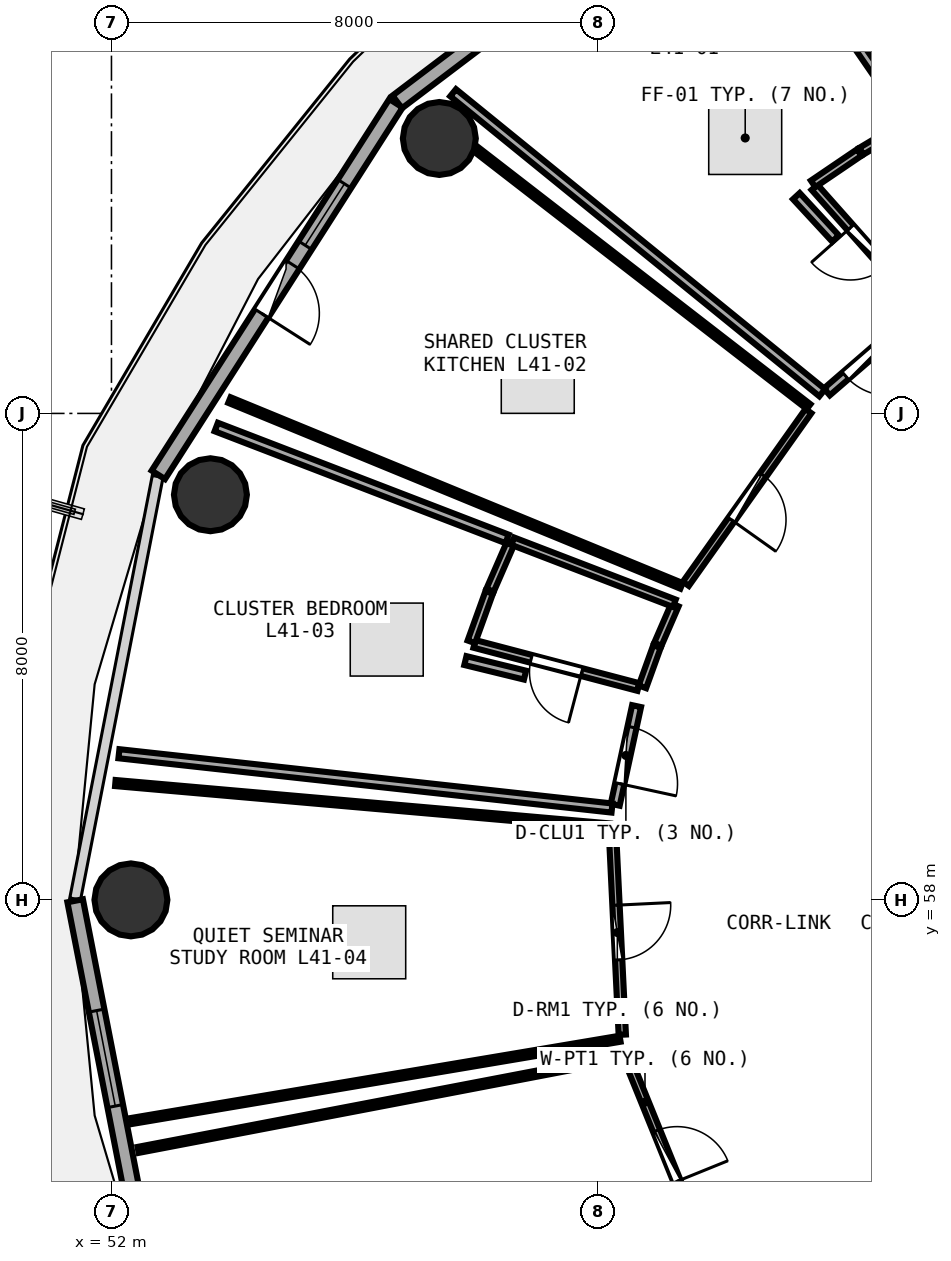
"""IFC4 building model, lengths in metres.
Left out: names, types, materials, properties, quantities, classifications, styles, units other than length and angle.
Written with IfcOpenShell. Run it as: python <this file> out.ifc"""

import sys

from ifc_helpers import new_model, si_unit, direction, frame, frame_2d, origin, origin_2d, place, context, subcontext, project, spatial, rectangle, circle, extrude, element, fill, save


model = new_model("IFC4")
c1 = context("Model", 3, precision=1e-05, world=origin(), true_north=direction((0.0, 1.0)))
c2 = subcontext(c1, "Body", "Model", "MODEL_VIEW")
j1 = project(units=[si_unit("LENGTHUNIT", "METRE"), si_unit("PLANEANGLEUNIT", "RADIAN")], contexts=[c1])
p1 = place(None, origin())
s1 = spatial("IfcSite", under=j1, at=p1, CompositionType="ELEMENT")
p2 = place(p1, origin())
s2 = spatial("IfcBuilding", under=s1, at=p2, CompositionType="ELEMENT")
p3 = place(p2, frame((0.0, 0.0, 161.85)))
s3 = spatial("IfcBuildingStorey", under=s2, at=p3, CompositionType="ELEMENT", Elevation=161.85)
for number, where, z_axis, x_axis in (
    (1, (57.392, 70.521, 0.0), (0.0, 0.0, 1.0), (1.0, 0.0, 0.0)),
    (2, (53.627, 64.663, 0.0), (0.0, 0.0, 1.0), (1.0, 0.0, 0.0)),
    (3, (52.32, 58.0, 0.0), (0.0, 0.0, 1.0), (1.0, 0.0, 0.0)),
):
    element("IfcColumn", number, at=place(p3, frame(where, z_axis=z_axis, x_axis=x_axis)), inside=s3, PredefinedType="COLUMN", context=c2, shape_type="SweptSolid", body=[
        extrude(circle(Radius=0.6, at=origin_2d()), origin(), (0.0, 0.0, 1.0), 3.75),
    ])
p4 = place(p3, frame((62.688, 75.658, 0.0), z_axis=(0.0, 0.0, 1.0), x_axis=(-0.797163719609, -0.603763202042, 0.0)))
e4 = element("IfcWall", 4, at=p4, inside=s3, PredefinedType="SOLIDWALL", context=c2, shape_type="SweptSolid", body=[
    extrude(rectangle(XDim=7.512, YDim=0.26, at=frame_2d((3.756, 0.0))), origin(), (0.0, 0.0, 1.0), 3.475),
])
p5 = place(p4, frame((2.956, 0.0, 0.85)))
e5 = element("IfcOpeningElement", 5, at=p5, cuts=e4, PredefinedType="OPENING", context=c2, shape_type="SweptSolid", body=[
    extrude(rectangle(XDim=1.6, YDim=1.45, at=frame_2d((0.8, 0.725))), frame((0.0, 0.14, 0.0), z_axis=(0.0, -1.0, 0.0), x_axis=(1.0, 0.0, 0.0)), (0.0, 0.0, 1.0), 0.28),
])
p6 = place(p3, frame((56.679, 71.1, 0.0), z_axis=(0.0, 0.0, 1.0), x_axis=(-0.538801521808, -0.842432739213, 0.0)))
e6 = element("IfcWall", 6, at=p6, inside=s3, PredefinedType="SOLIDWALL", context=c2, shape_type="SweptSolid", body=[
    extrude(rectangle(XDim=7.253, YDim=0.26, at=frame_2d((3.627, 0.0))), origin(), (0.0, 0.0, 1.0), 3.475),
])
p7 = place(p6, frame((3.152, 0.0, 0.0)))
e7 = element("IfcOpeningElement", 7, at=p7, cuts=e6, PredefinedType="OPENING", context=c2, shape_type="SweptSolid", body=[
    extrude(rectangle(XDim=0.95, YDim=2.1, at=frame_2d((0.475, 1.05))), frame((0.0, 0.14, 0.0), z_axis=(0.0, -1.0, 0.0), x_axis=(1.0, 0.0, 0.0)), (0.0, 0.0, 1.0), 0.28),
])
p8 = place(p6, frame((1.572, 0.0, 0.85)))
e8 = element("IfcOpeningElement", 8, at=p8, cuts=e6, PredefinedType="OPENING", context=c2, shape_type="SweptSolid", body=[
    extrude(rectangle(XDim=1.2, YDim=1.45, at=frame_2d((0.6, 0.725))), frame((0.0, 0.14, 0.0), z_axis=(0.0, -1.0, 0.0), x_axis=(1.0, 0.0, 0.0)), (0.0, 0.0, 1.0), 0.28),
])
p9 = place(p3, frame((51.403, 57.985, 0.0), z_axis=(0.0, 0.0, 1.0), x_axis=(0.191716984769, -0.981450252306, 0.0)))
e9 = element("IfcWall", 9, at=p9, inside=s3, PredefinedType="SOLIDWALL", context=c2, shape_type="SweptSolid", body=[
    extrude(rectangle(XDim=7.079, YDim=0.26, at=frame_2d((3.54, 0.0))), origin(), (0.0, 0.0, 1.0), 3.475),
])
p10 = place(p9, frame((1.84, 0.0, 0.85)))
e10 = element("IfcOpeningElement", 10, at=p10, cuts=e9, PredefinedType="OPENING", context=c2, shape_type="SweptSolid", body=[
    extrude(rectangle(XDim=1.6, YDim=1.45, at=frame_2d((0.8, 0.725))), frame((0.0, 0.14, 0.0), z_axis=(0.0, -1.0, 0.0), x_axis=(1.0, 0.0, 0.0)), (0.0, 0.0, 1.0), 0.28),
])
p11 = place(p3, frame((65.315, 67.747, 0.0), z_axis=(0.0, 0.0, 1.0), x_axis=(-0.664185753234, 0.74756757902, 0.0)))
e11 = element("IfcWall", 11, at=p11, inside=s3, PredefinedType="PLUMBINGWALL", context=c2, shape_type="SweptSolid", body=[
    extrude(rectangle(XDim=2.638, YDim=0.13, at=frame_2d((1.319, 0.0))), origin(), (0.0, 0.0, 1.0), 2.975),
])
p12 = place(p11, frame((0.889, 0.0, 0.0)))
e12 = element("IfcOpeningElement", 12, at=p12, cuts=e11, PredefinedType="OPENING", context=c2, shape_type="SweptSolid", body=[
    extrude(rectangle(XDim=0.86, YDim=2.05, at=frame_2d((0.43, 1.025))), frame((0.0, 0.075, 0.0), z_axis=(0.0, -1.0, 0.0), x_axis=(1.0, 0.0, 0.0)), (0.0, 0.0, 1.0), 0.15),
])
p13 = place(p3, frame((65.094, 67.505, 0.0), z_axis=(0.0, 0.0, 1.0), x_axis=(-0.756110527693, -0.654443939472, 0.0)))
e13 = element("IfcWall", 13, at=p13, inside=s3, PredefinedType="PARTITIONING", context=c2, shape_type="SweptSolid", body=[
    extrude(rectangle(XDim=1.758, YDim=0.15, at=frame_2d((0.879, 0.0))), origin(), (0.0, 0.0, 1.0), 2.975),
])
p14 = place(p13, frame((0.404, 0.0, 0.0)))
e14 = element("IfcOpeningElement", 14, at=p14, cuts=e13, PredefinedType="OPENING", context=c2, shape_type="SweptSolid", body=[
    extrude(rectangle(XDim=0.95, YDim=2.08, at=frame_2d((0.475, 1.04))), frame((0.0, 0.085, 0.0), z_axis=(0.0, -1.0, 0.0), x_axis=(1.0, 0.0, 0.0)), (0.0, 0.0, 1.0), 0.17),
])
p15 = place(p3, frame((63.462, 66.038, 0.0), z_axis=(0.0, 0.0, 1.0), x_axis=(-0.578762045024, -0.815496471629, 0.0)))
e15 = element("IfcWall", 15, at=p15, inside=s3, PredefinedType="PARTITIONING", context=c2, shape_type="SweptSolid", body=[
    extrude(rectangle(XDim=3.483, YDim=0.12, at=frame_2d((1.741, 0.0))), origin(), (0.0, 0.0, 1.0), 2.975),
])
p16 = place(p15, frame((1.291, 0.0, 0.0)))
e16 = element("IfcOpeningElement", 16, at=p16, cuts=e15, PredefinedType="OPENING", context=c2, shape_type="SweptSolid", body=[
    extrude(rectangle(XDim=0.9, YDim=2.08, at=frame_2d((0.45, 1.04))), frame((0.0, 0.07, 0.0), z_axis=(0.0, -1.0, 0.0), x_axis=(1.0, 0.0, 0.0)), (0.0, 0.0, 1.0), 0.14),
])
p17 = place(p3, frame((60.667, 61.5, 0.0), z_axis=(0.0, 0.0, 1.0), x_axis=(-0.967098346806, 0.254402805813, 0.0)))
e17 = element("IfcWall", 17, at=p17, inside=s3, PredefinedType="PLUMBINGWALL", context=c2, shape_type="SweptSolid", body=[
    extrude(rectangle(XDim=2.789, YDim=0.13, at=frame_2d((1.395, 0.0))), origin(), (0.0, 0.0, 1.0), 3.175),
])
p18 = place(p17, frame((0.964, 0.0, 0.0)))
e18 = element("IfcOpeningElement", 18, at=p18, cuts=e17, PredefinedType="OPENING", context=c2, shape_type="SweptSolid", body=[
    extrude(rectangle(XDim=0.86, YDim=2.05, at=frame_2d((0.43, 1.025))), frame((0.0, 0.075, 0.0), z_axis=(0.0, -1.0, 0.0), x_axis=(1.0, 0.0, 0.0)), (0.0, 0.0, 1.0), 0.15),
])
p19 = place(p3, frame((60.636, 61.186, 0.0), z_axis=(0.0, 0.0, 1.0), x_axis=(-0.211879832264, -0.977295726318, 0.0)))
e19 = element("IfcWall", 19, at=p19, inside=s3, PredefinedType="PARTITIONING", context=c2, shape_type="SweptSolid", body=[
    extrude(rectangle(XDim=1.659, YDim=0.15, at=frame_2d((0.83, 0.0))), origin(), (0.0, 0.0, 1.0), 3.48),
])
p20 = place(p19, frame((0.355, 0.0, 0.0)))
e20 = element("IfcOpeningElement", 20, at=p20, cuts=e19, PredefinedType="OPENING", context=c2, shape_type="SweptSolid", body=[
    extrude(rectangle(XDim=0.95, YDim=2.08, at=frame_2d((0.475, 1.04))), frame((0.0, 0.085, 0.0), z_axis=(0.0, -1.0, 0.0), x_axis=(1.0, 0.0, 0.0)), (0.0, 0.0, 1.0), 0.17),
])
p21 = place(p3, frame((60.238, 59.144, 0.0), z_axis=(0.0, 0.0, 1.0), x_axis=(0.048537190422, -0.998821375996, 0.0)))
e21 = element("IfcWall", 21, at=p21, inside=s3, PredefinedType="PARTITIONING", context=c2, shape_type="SweptSolid", body=[
    extrude(rectangle(XDim=3.365, YDim=0.12, at=frame_2d((1.683, 0.0))), origin(), (0.0, 0.0, 1.0), 2.975),
])
p22 = place(p21, frame((1.233, 0.0, 0.0)))
e22 = element("IfcOpeningElement", 22, at=p22, cuts=e21, PredefinedType="OPENING", context=c2, shape_type="SweptSolid", body=[
    extrude(rectangle(XDim=0.9, YDim=2.08, at=frame_2d((0.45, 1.04))), frame((0.0, 0.07, 0.0), z_axis=(0.0, -1.0, 0.0), x_axis=(1.0, 0.0, 0.0)), (0.0, 0.0, 1.0), 0.14),
])
p23 = place(p3, frame((60.492, 55.369, 0.0), z_axis=(0.0, 0.0, 1.0), x_axis=(0.3756420079, -0.926764847143, 0.0)))
e23 = element("IfcWall", 23, at=p23, inside=s3, PredefinedType="PARTITIONING", context=c2, shape_type="SweptSolid", body=[
    extrude(rectangle(XDim=3.413, YDim=0.12, at=frame_2d((1.707, 0.0))), origin(), (0.0, 0.0, 1.0), 3.235),
])
p24 = place(p23, frame((1.256, 0.0, 0.0)))
e24 = element("IfcOpeningElement", 24, at=p24, cuts=e23, PredefinedType="OPENING", context=c2, shape_type="SweptSolid", body=[
    extrude(rectangle(XDim=0.9, YDim=2.08, at=frame_2d((0.45, 1.04))), frame((0.0, 0.07, 0.0), z_axis=(0.0, -1.0, 0.0), x_axis=(1.0, 0.0, 0.0)), (0.0, 0.0, 1.0), 0.14),
])
p25 = place(p3, frame((67.063, 68.799, 0.0), z_axis=(0.0, 0.0, 1.0), x_axis=(-0.538644897025, 0.842532892479, 0.0)))
e25 = element("IfcWall", 25, at=p25, inside=s3, PredefinedType="PARTITIONING", context=c2, shape_type="SweptSolid", body=[
    extrude(rectangle(XDim=6.594, YDim=0.1, at=frame_2d((3.297, 0.0))), origin(), (0.0, 0.0, 1.0), 3.175),
])
p26 = place(p3, frame((63.54, 69.775, 0.0), z_axis=(0.0, 0.0, 1.0), x_axis=(0.827440475962, 0.561553433558, 0.0)))
e26 = element("IfcWall", 26, at=p26, inside=s3, PredefinedType="PLUMBINGWALL", context=c2, shape_type="SweptSolid", body=[
    extrude(rectangle(XDim=0.918, YDim=0.13, at=frame_2d((0.459, 0.0))), origin(), (0.0, 0.0, 1.0), 2.975),
])
p27 = place(p3, frame((64.333, 70.312, 0.0), z_axis=(0.0, 0.0, 1.0), x_axis=(0.858494754448, 0.512822344077, 0.0)))
e27 = element("IfcWall", 27, at=p27, inside=s3, PredefinedType="PLUMBINGWALL", context=c2, shape_type="SweptSolid", body=[
    extrude(rectangle(XDim=0.923, YDim=0.13, at=frame_2d((0.461, 0.0))), origin(), (0.0, 0.0, 1.0), 2.975),
])
p28 = place(p3, frame((63.689, 66.34, 0.0), z_axis=(0.0, 0.0, 1.0), x_axis=(-0.77600992695, 0.630720693553, 0.0)))
e28 = element("IfcWall", 28, at=p28, inside=s3, PredefinedType="PARTITIONING", context=c2, shape_type="SweptSolid", body=[
    extrude(rectangle(XDim=7.822, YDim=0.15, at=frame_2d((3.911, 0.0))), origin(), (0.0, 0.0, 1.0), 2.975),
])
p29 = place(p3, frame((62.355, 74.845, 0.0), z_axis=(0.0, 0.0, 1.0), x_axis=(0.56747106095, -0.823393341596, 0.0)))
e29 = element("IfcWall", 29, at=p29, inside=s3, PredefinedType="PARTITIONING", context=c2, shape_type="SweptSolid", body=[
    extrude(rectangle(XDim=4.837, YDim=0.15, at=frame_2d((2.418, 0.0))), origin(), (0.0, 0.0, 1.0), 2.975),
])
p30 = place(p3, frame((63.264, 69.573, 0.0), z_axis=(0.0, 0.0, 1.0), x_axis=(0.678771543933, -0.734349502041, 0.0)))
e30 = element("IfcWall", 30, at=p30, inside=s3, PredefinedType="PARTITIONING", context=c2, shape_type="SweptSolid", body=[
    extrude(rectangle(XDim=0.949, YDim=0.15, at=frame_2d((0.474, 0.0))), origin(), (0.0, 0.0, 1.0), 3.48),
])
p31 = place(p3, frame((61.375, 63.164, 0.0), z_axis=(0.0, 0.0, 1.0), x_axis=(-0.924943940784, 0.380103546953, 0.0)))
e31 = element("IfcWall", 31, at=p31, inside=s3, PredefinedType="PARTITIONING", context=c2, shape_type="SweptSolid", body=[
    extrude(rectangle(XDim=8.038, YDim=0.1, at=frame_2d((4.019, 0.0))), origin(), (0.0, 0.0, 1.0), 2.975),
])
p32 = place(p3, frame((57.992, 70.346, 0.0), z_axis=(0.0, 0.0, 1.0), x_axis=(0.790939607083, -0.611894221207, 0.0)))
e32 = element("IfcWall", 32, at=p32, inside=s3, PredefinedType="PARTITIONING", context=c2, shape_type="SweptSolid", body=[
    extrude(rectangle(XDim=6.92, YDim=0.1, at=frame_2d((3.46, 0.0))), origin(), (0.0, 0.0, 1.0), 2.975),
])
p33 = place(p3, frame((61.268, 62.853, 0.0), z_axis=(0.0, 0.0, 1.0), x_axis=(-0.398284741881, -0.917261829787, 0.0)))
e33 = element("IfcWall", 33, at=p33, inside=s3, PredefinedType="PLUMBINGWALL", context=c2, shape_type="SweptSolid", body=[
    extrude(rectangle(XDim=0.708, YDim=0.13, at=frame_2d((0.354, 0.0))), origin(), (0.0, 0.0, 1.0), 3.235),
])
p34 = place(p3, frame((60.971, 62.166, 0.0), z_axis=(0.0, 0.0, 1.0), x_axis=(-0.340044773791, -0.940409246987, 0.0)))
e34 = element("IfcWall", 34, at=p34, inside=s3, PredefinedType="PLUMBINGWALL", context=c2, shape_type="SweptSolid", body=[
    extrude(rectangle(XDim=0.704, YDim=0.13, at=frame_2d((0.352, 0.0))), origin(), (0.0, 0.0, 1.0), 3.235),
])
p35 = place(p3, frame((57.919, 62.244, 0.0), z_axis=(0.0, 0.0, 1.0), x_axis=(0.339790338004, 0.9405012101, 0.0)))
e35 = element("IfcWall", 35, at=p35, inside=s3, PredefinedType="PLUMBINGWALL", context=c2, shape_type="SweptSolid", body=[
    extrude(rectangle(XDim=0.864, YDim=0.13, at=frame_2d((0.432, 0.0))), origin(), (0.0, 0.0, 1.0), 3.175),
])
p36 = place(p3, frame((58.227, 63.093, 0.0), z_axis=(0.0, 0.0, 1.0), x_axis=(0.39925148709, 0.916841453064, 0.0)))
e36 = element("IfcWall", 36, at=p36, inside=s3, PredefinedType="PLUMBINGWALL", context=c2, shape_type="SweptSolid", body=[
    extrude(rectangle(XDim=0.866, YDim=0.13, at=frame_2d((0.433, 0.0))), origin(), (0.0, 0.0, 1.0), 3.175),
])
p37 = place(p3, frame((58.6, 63.899, 0.0), z_axis=(0.0, 0.0, 1.0), x_axis=(0.933544382438, -0.358461833418, 0.0)))
e37 = element("IfcWall", 37, at=p37, inside=s3, PredefinedType="PLUMBINGWALL", context=c2, shape_type="SweptSolid", body=[
    extrude(rectangle(XDim=2.847, YDim=0.13, at=frame_2d((1.423, 0.0))), origin(), (0.0, 0.0, 1.0), 3.175),
])
p38 = place(p3, frame((60.232, 59.51, 0.0), z_axis=(0.0, 0.0, 1.0), x_axis=(-0.993990557846, 0.109465843587, 0.0)))
e38 = element("IfcWall", 38, at=p38, inside=s3, PredefinedType="PARTITIONING", context=c2, shape_type="SweptSolid", body=[
    extrude(rectangle(XDim=8.158, YDim=0.15, at=frame_2d((4.079, 0.0))), origin(), (0.0, 0.0, 1.0), 3.025),
])
p39 = place(p3, frame((53.723, 65.777, 0.0), z_axis=(0.0, 0.0, 1.0), x_axis=(0.933303856141, -0.359087610636, 0.0)))
e39 = element("IfcWall", 39, at=p39, inside=s3, PredefinedType="PARTITIONING", context=c2, shape_type="SweptSolid", body=[
    extrude(rectangle(XDim=5.125, YDim=0.15, at=frame_2d((2.562, 0.0))), origin(), (0.0, 0.0, 1.0), 2.975),
])
p40 = place(p3, frame((57.821, 61.936, 0.0), z_axis=(0.0, 0.0, 1.0), x_axis=(0.971451046406, -0.237240098712, 0.0)))
e40 = element("IfcWall", 40, at=p40, inside=s3, PredefinedType="PARTITIONING", context=c2, shape_type="SweptSolid", body=[
    extrude(rectangle(XDim=1.01, YDim=0.15, at=frame_2d((0.505, 0.0))), origin(), (0.0, 0.0, 1.0), 3.175),
])
p41 = place(p3, frame((60.365, 55.716, 0.0), z_axis=(0.0, 0.0, 1.0), x_axis=(-0.986127701838, -0.165988420279, 0.0)))
e41 = element("IfcWall", 41, at=p41, inside=s3, PredefinedType="PARTITIONING", context=c2, shape_type="SweptSolid", body=[
    extrude(rectangle(XDim=8.144, YDim=0.1, at=frame_2d((4.072, 0.0))), origin(), (0.0, 0.0, 1.0), 3.025),
])
p42 = place(p3, frame((52.064, 59.921, 0.0), z_axis=(0.0, 0.0, 1.0), x_axis=(0.996168646625, -0.087453001553, 0.0)))
e42 = element("IfcWall", 42, at=p42, inside=s3, PredefinedType="PARTITIONING", context=c2, shape_type="SweptSolid", body=[
    extrude(rectangle(XDim=8.163, YDim=0.1, at=frame_2d((4.082, 0.0))), origin(), (0.0, 0.0, 1.0), 3.025),
])
p43 = place(p3, frame((52.438, 53.888, 0.0), z_axis=(0.0, 0.0, 1.0), x_axis=(0.982187250003, 0.187904778897, 0.0)))
e43 = element("IfcWall", 43, at=p43, inside=s3, PredefinedType="PARTITIONING", context=c2, shape_type="SweptSolid", body=[
    extrude(rectangle(XDim=8.137, YDim=0.1, at=frame_2d((4.069, 0.0))), origin(), (0.0, 0.0, 1.0), 3.025),
])
p44 = place(p7, frame((0.95, 0.0, 0.0), z_axis=(0.0, 0.0, 1.0), x_axis=(-1.0, 0.0, 0.0)))
e44 = element("IfcDoor", 44, at=p44, inside=s3, OperationType="SINGLE_SWING_LEFT", PredefinedType="DOOR", context=c2, shape_type="SweptSolid", body=[
    extrude(rectangle(XDim=0.95, YDim=2.1, at=frame_2d((0.475, 1.05))), frame((0.0, 0.025, 0.0), z_axis=(0.0, -1.0, 0.0), x_axis=(1.0, 0.0, 0.0)), (0.0, 0.0, 1.0), 0.05),
])
fill(e7, e44)
p45 = place(p8, origin())
e45 = element("IfcWindow", 45, at=p45, inside=s3, PartitioningType="SINGLE_PANEL", PredefinedType="WINDOW", context=c2, shape_type="SweptSolid", body=[
    extrude(rectangle(XDim=1.2, YDim=1.45, at=frame_2d((0.6, 0.725))), frame((0.0, 0.03, 0.0), z_axis=(0.0, -1.0, 0.0), x_axis=(1.0, 0.0, 0.0)), (0.0, 0.0, 1.0), 0.06),
])
fill(e8, e45)
p46 = place(p10, origin())
e46 = element("IfcWindow", 46, at=p46, inside=s3, PartitioningType="SINGLE_PANEL", PredefinedType="WINDOW", context=c2, shape_type="SweptSolid", body=[
    extrude(rectangle(XDim=1.6, YDim=1.45, at=frame_2d((0.8, 0.725))), frame((0.0, 0.03, 0.0), z_axis=(0.0, -1.0, 0.0), x_axis=(1.0, 0.0, 0.0)), (0.0, 0.0, 1.0), 0.06),
])
fill(e10, e46)
p47 = place(p12, origin())
e47 = element("IfcDoor", 47, at=p47, inside=s3, OperationType="SINGLE_SWING_RIGHT", PredefinedType="DOOR", context=c2, shape_type="SweptSolid", body=[
    extrude(rectangle(XDim=0.86, YDim=2.05, at=frame_2d((0.43, 1.025))), frame((0.0, 0.025, 0.0), z_axis=(0.0, -1.0, 0.0), x_axis=(1.0, 0.0, 0.0)), (0.0, 0.0, 1.0), 0.05),
])
fill(e12, e47)
p48 = place(p14, origin())
e48 = element("IfcDoor", 48, at=p48, inside=s3, OperationType="SINGLE_SWING_LEFT", PredefinedType="DOOR", context=c2, shape_type="SweptSolid", body=[
    extrude(rectangle(XDim=0.95, YDim=2.08, at=frame_2d((0.475, 1.04))), frame((0.0, 0.025, 0.0), z_axis=(0.0, -1.0, 0.0), x_axis=(1.0, 0.0, 0.0)), (0.0, 0.0, 1.0), 0.05),
])
fill(e14, e48)
p49 = place(p16, origin())
e49 = element("IfcDoor", 49, at=p49, inside=s3, OperationType="SINGLE_SWING_RIGHT", PredefinedType="DOOR", context=c2, shape_type="SweptSolid", body=[
    extrude(rectangle(XDim=0.9, YDim=2.08, at=frame_2d((0.45, 1.04))), frame((0.0, 0.025, 0.0), z_axis=(0.0, -1.0, 0.0), x_axis=(1.0, 0.0, 0.0)), (0.0, 0.0, 1.0), 0.05),
])
fill(e16, e49)
p50 = place(p18, origin())
e50 = element("IfcDoor", 50, at=p50, inside=s3, OperationType="SINGLE_SWING_LEFT", PredefinedType="DOOR", context=c2, shape_type="SweptSolid", body=[
    extrude(rectangle(XDim=0.86, YDim=2.05, at=frame_2d((0.43, 1.025))), frame((0.0, 0.025, 0.0), z_axis=(0.0, -1.0, 0.0), x_axis=(1.0, 0.0, 0.0)), (0.0, 0.0, 1.0), 0.05),
])
fill(e18, e50)
p51 = place(p20, origin())
e51 = element("IfcDoor", 51, at=p51, inside=s3, OperationType="SINGLE_SWING_RIGHT", PredefinedType="DOOR", context=c2, shape_type="SweptSolid", body=[
    extrude(rectangle(XDim=0.95, YDim=2.08, at=frame_2d((0.475, 1.04))), frame((0.0, 0.025, 0.0), z_axis=(0.0, -1.0, 0.0), x_axis=(1.0, 0.0, 0.0)), (0.0, 0.0, 1.0), 0.05),
])
fill(e20, e51)
p52 = place(p22, origin())
e52 = element("IfcDoor", 52, at=p52, inside=s3, OperationType="SINGLE_SWING_LEFT", PredefinedType="DOOR", context=c2, shape_type="SweptSolid", body=[
    extrude(rectangle(XDim=0.9, YDim=2.08, at=frame_2d((0.45, 1.04))), frame((0.0, 0.025, 0.0), z_axis=(0.0, -1.0, 0.0), x_axis=(1.0, 0.0, 0.0)), (0.0, 0.0, 1.0), 0.05),
])
fill(e22, e52)
p53 = place(p24, origin())
e53 = element("IfcDoor", 53, at=p53, inside=s3, OperationType="SINGLE_SWING_RIGHT", PredefinedType="DOOR", context=c2, shape_type="SweptSolid", body=[
    extrude(rectangle(XDim=0.9, YDim=2.08, at=frame_2d((0.45, 1.04))), frame((0.0, 0.025, 0.0), z_axis=(0.0, -1.0, 0.0), x_axis=(1.0, 0.0, 0.0)), (0.0, 0.0, 1.0), 0.05),
])
fill(e24, e53)
save(model, sys.argv[1])
